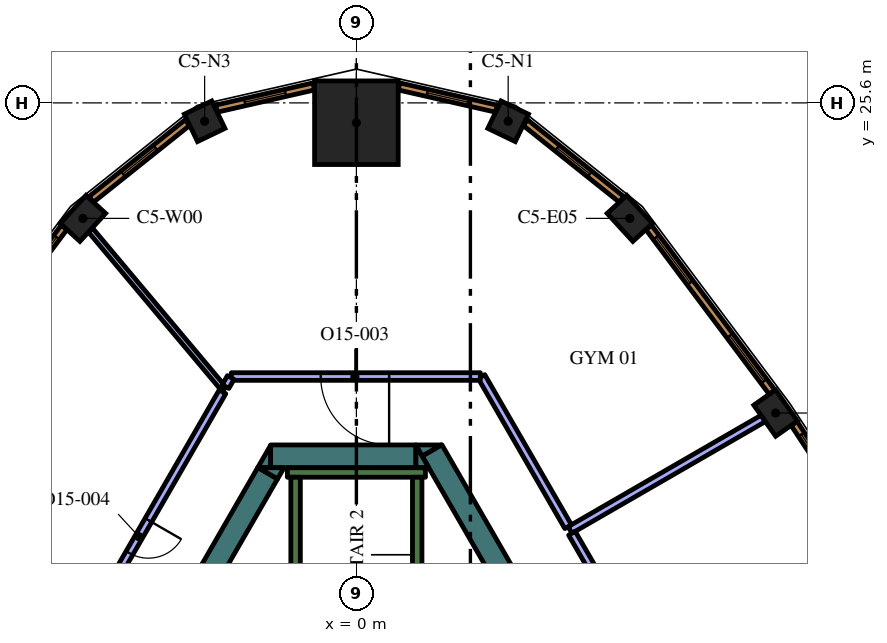
"""IFC4 building model, lengths in metres.
Left out: names, types, materials, properties, quantities, classifications, styles, units other than length and angle.
Written with IfcOpenShell. Run it as: python <this file> out.ifc"""

import sys

from ifc_helpers import new_model, si_unit, direction, frame, frame_2d, origin, origin_2d, place, context, subcontext, project, spatial, polyline, rectangle, outline, extrude, element, fill, save


model = new_model("IFC4")
c1 = context("Model", 3, precision=1e-05, world=origin(), true_north=direction((0.0, 1.0)))
c2 = subcontext(c1, "Body", "Model", "MODEL_VIEW")
j1 = project(units=[si_unit("LENGTHUNIT", "METRE"), si_unit("PLANEANGLEUNIT", "RADIAN")], contexts=[c1])
p1 = place(None, origin())
s1 = spatial("IfcSite", under=j1, at=p1, CompositionType="ELEMENT")
p2 = place(p1, origin())
s2 = spatial("IfcBuilding", under=s1, at=p2, CompositionType="ELEMENT")
p3 = place(p2, frame((0.0, 0.0, 317.4)))
s3 = spatial("IfcBuildingStorey", under=s2, at=p3, CompositionType="ELEMENT", Elevation=317.4)
p4 = place(p3, frame((0.0, 25.078, 0.0), z_axis=(0.0, 0.0, 1.0), x_axis=(0.0, 1.0, 0.0)))
e1 = element("IfcColumn", 1, at=p4, inside=s3, PredefinedType="COLUMN", context=c2, shape_type="SweptSolid", body=[
    extrude(rectangle(XDim=2.2, YDim=2.2, at=origin_2d()), origin(), (0.0, 0.0, 1.0), 4.2),
])
for number, where, z_axis, x_axis in (
    (2, (11.032, 17.44, 0.0), (0.0, 0.0, 1.0), (-0.575, 0.818, 0.0)),
    (3, (7.195, 22.561, 0.0), (0.0, 0.0, 1.0), (-0.676, 0.737, 0.0)),
):
    element("IfcColumn", number, at=place(p3, frame(where, z_axis=z_axis, x_axis=x_axis)), inside=s3, PredefinedType="COLUMN", context=c2, shape_type="SweptSolid", body=[
        extrude(rectangle(XDim=1.0, YDim=0.7, at=origin_2d()), origin(), (0.0, 0.0, 1.0), 4.2),
    ])
for number, where, z_axis, x_axis in (
    (4, (3.993, 25.116, 0.0), (0.0, 0.0, 1.0), (-0.901, 0.434, 0.0)),
    (5, (-3.993, 25.116, 0.0), (0.0, 0.0, 1.0), (-0.901, -0.434, 0.0)),
):
    element("IfcColumn", number, at=place(p3, frame(where, z_axis=z_axis, x_axis=x_axis)), inside=s3, PredefinedType="COLUMN", context=c2, shape_type="SweptSolid", body=[
        extrude(rectangle(XDim=0.8, YDim=0.8, at=origin_2d()), origin(), (0.0, 0.0, 1.0), 4.2),
    ])
p5 = place(p3, frame((-7.195, 22.561, 0.0), z_axis=(0.0, 0.0, 1.0), x_axis=(-0.67580250023, -0.737082750228, 0.0)))
e6 = element("IfcColumn", 6, at=p5, inside=s3, PredefinedType="COLUMN", context=c2, shape_type="SweptSolid", body=[
    extrude(rectangle(XDim=1.0, YDim=0.7, at=origin_2d()), origin(), (0.0, 0.0, 1.0), 4.2),
])
p6 = place(p3, frame((1.989, 16.456, 0.0), z_axis=(0.0, 0.0, 1.0), x_axis=(0.49999102663, -0.8660305845, 0.0)))
e7 = element("IfcWall", 7, at=p6, inside=s3, PredefinedType="SOLIDWALL", context=c2, shape_type="SweptSolid", body=[
    extrude(rectangle(XDim=12.406, YDim=0.6, at=frame_2d((6.203, 0.0))), origin(), (0.0, 0.0, 1.0), 4.2),
])
p7 = place(p3, origin())
e8 = element("IfcWall", 8, at=p7, inside=s3, PredefinedType="SOLIDWALL", context=c2, shape_type="SweptSolid", body=[
    extrude(outline(polyline([(1.559, 16.6), (2.235, 16.6), (1.728, 16.307), (1.559, 16.6)])), origin(), (0.0, 0.0, 1.0), 4.2),
])
p8 = place(p3, frame((-2.258, 16.3, 0.0), z_axis=(0.0, 0.0, 1.0), x_axis=(1.0, 0.0, 0.0)))
e9 = element("IfcWall", 9, at=p8, inside=s3, PredefinedType="SOLIDWALL", context=c2, shape_type="SweptSolid", body=[
    extrude(rectangle(XDim=3.823, YDim=0.6, at=frame_2d((1.912, 0.0))), origin(), (0.0, 0.0, 1.0), 4.2),
])
e10 = element("IfcWall", 10, at=p7, inside=s3, PredefinedType="SOLIDWALL", context=c2, shape_type="SweptSolid", body=[
    extrude(outline(polyline([(1.905, 16.0), (1.567, 16.0), (1.567, 16.585), (1.905, 16.0)])), origin(), (0.0, 0.0, 1.0), 4.2),
])
e11 = element("IfcWall", 11, at=p7, inside=s3, PredefinedType="SOLIDWALL", context=c2, shape_type="SweptSolid", body=[
    extrude(outline(polyline([(-2.598, 16.0), (-2.26, 16.585), (-2.26, 16.0), (-2.598, 16.0)])), origin(), (0.0, 0.0, 1.0), 4.2),
])
p9 = place(p3, frame((-2.335, 15.855, 0.0), z_axis=(0.0, 0.0, 1.0), x_axis=(-0.499960127962, -0.866048422692, 0.0)))
e12 = element("IfcWall", 12, at=p9, inside=s3, PredefinedType="SOLIDWALL", context=c2, shape_type="SweptSolid", body=[
    extrude(rectangle(XDim=2.934, YDim=0.6, at=frame_2d((1.467, 0.0))), origin(), (0.0, 0.0, 1.0), 4.2),
])
e13 = element("IfcWall", 13, at=p7, inside=s3, PredefinedType="SOLIDWALL", context=c2, shape_type="SweptSolid", body=[
    extrude(outline(polyline([(-1.905, 16.0), (-2.074, 15.707), (-2.581, 16.0), (-1.905, 16.0)])), origin(), (0.0, 0.0, 1.0), 4.2),
])
p10 = place(p3, frame((-1.817, 15.875, 0.0), z_axis=(0.0, 0.0, 1.0), x_axis=(1.0, 0.0, 0.0)))
e14 = element("IfcWall", 14, at=p10, inside=s3, PredefinedType="SOLIDWALL", context=c2, shape_type="SweptSolid", body=[
    extrude(rectangle(XDim=3.634, YDim=0.25, at=frame_2d((1.817, 0.0))), origin(), (0.0, 0.0, 1.0), 4.2),
])
p11 = place(p3, frame((1.6, 8.95, 0.0), z_axis=(0.0, 0.0, 1.0), x_axis=(0.0, 1.0, 0.0)))
e15 = element("IfcWall", 15, at=p11, inside=s3, PredefinedType="SOLIDWALL", context=c2, shape_type="SweptSolid", body=[
    extrude(rectangle(XDim=6.8, YDim=0.25, at=frame_2d((3.4, 0.0))), origin(), (0.0, 0.0, 1.0), 4.2),
])
p12 = place(p3, frame((-1.6, 8.7, 0.0), z_axis=(0.0, 0.0, 1.0), x_axis=(0.0, 1.0, 0.0)))
e16 = element("IfcWall", 16, at=p12, inside=s3, PredefinedType="SOLIDWALL", context=c2, shape_type="SweptSolid", body=[
    extrude(rectangle(XDim=7.05, YDim=0.25, at=frame_2d((3.525, 0.0))), origin(), (0.0, 0.0, 1.0), 4.2),
])
p13 = place(p3, frame((5.622, 14.363, 0.0), z_axis=(0.0, 0.0, 1.0), x_axis=(0.866030409726, 0.499991329354, 0.0)))
e17 = element("IfcWall", 17, at=p13, inside=s3, PredefinedType="PARTITIONING", context=c2, shape_type="SweptSolid", body=[
    extrude(rectangle(XDim=5.869, YDim=0.2, at=frame_2d((2.934, 0.0))), origin(), (0.0, 0.0, 1.0), 3.5),
])
p14 = place(p3, frame((7.921, 10.381, 0.0), z_axis=(0.0, 0.0, 1.0), x_axis=(-0.500021625289, 0.866012918058, 0.0)))
e18 = element("IfcWall", 18, at=p14, inside=s3, PredefinedType="PARTITIONING", context=c2, shape_type="SweptSolid", body=[
    extrude(rectangle(XDim=4.497, YDim=0.2, at=frame_2d((2.249, 0.0))), origin(), (0.0, 0.0, 1.0), 3.5),
])
p15 = place(p3, frame((-3.483, 18.067, 0.0), z_axis=(0.0, 0.0, 1.0), x_axis=(-0.642968046165, 0.765893002717, 0.0)))
e19 = element("IfcWall", 19, at=p15, inside=s3, PredefinedType="PARTITIONING", context=c2, shape_type="SweptSolid", body=[
    extrude(rectangle(XDim=5.47, YDim=0.15, at=frame_2d((2.735, 0.0))), origin(), (0.0, 0.0, 1.0), 3.5),
])
p16 = place(p3, frame((5.572, 14.449, 0.0), z_axis=(0.0, 0.0, 1.0), x_axis=(-0.500012761589, 0.866018035752, 0.0)))
e20 = element("IfcWall", 20, at=p16, inside=s3, PredefinedType="PARTITIONING", context=c2, shape_type="SweptSolid", body=[
    extrude(rectangle(XDim=4.562, YDim=0.2, at=frame_2d((2.281, 0.0))), origin(), (0.0, 0.0, 1.0), 3.5),
])
p17 = place(p3, frame((3.261, 18.4, 0.0), z_axis=(0.0, 0.0, 1.0), x_axis=(-1.0, 0.0, 0.0)))
e21 = element("IfcWall", 21, at=p17, inside=s3, PredefinedType="PARTITIONING", context=c2, shape_type="SweptSolid", body=[
    extrude(rectangle(XDim=6.552, YDim=0.2, at=frame_2d((3.276, 0.0))), origin(), (0.0, 0.0, 1.0), 3.5),
])
p18 = place(p17, frame((2.4, 0.0, 0.0)))
e22 = element("IfcOpeningElement", 22, at=p18, cuts=e21, PredefinedType="OPENING", context=c2, shape_type="SweptSolid", body=[
    extrude(rectangle(XDim=1.8, YDim=2.1, at=frame_2d((0.9, 1.05))), frame((0.0, 0.11, 0.0), z_axis=(0.0, -1.0, 0.0), x_axis=(1.0, 0.0, 0.0)), (0.0, 0.0, 1.0), 0.22),
])
p19 = place(p3, frame((-3.306, 18.374, 0.0), z_axis=(0.0, 0.0, 1.0), x_axis=(-0.500055614084, -0.865993292597, 0.0)))
e23 = element("IfcWall", 23, at=p19, inside=s3, PredefinedType="PARTITIONING", context=c2, shape_type="SweptSolid", body=[
    extrude(rectangle(XDim=0.275, YDim=0.2, at=frame_2d((0.137, 0.0))), origin(), (0.0, 0.0, 1.0), 3.5),
])
p20 = place(p3, frame((-3.523, 17.998, 0.0), z_axis=(0.0, 0.0, 1.0), x_axis=(-0.499996383721, -0.866027491634, 0.0)))
e24 = element("IfcWall", 24, at=p20, inside=s3, PredefinedType="PARTITIONING", context=c2, shape_type="SweptSolid", body=[
    extrude(rectangle(XDim=8.795, YDim=0.2, at=frame_2d((4.397, 0.0))), origin(), (0.0, 0.0, 1.0), 3.5),
])
p21 = place(p20, frame((3.9, 0.0, 0.0)))
e25 = element("IfcOpeningElement", 25, at=p21, cuts=e24, PredefinedType="OPENING", context=c2, shape_type="SweptSolid", body=[
    extrude(rectangle(XDim=1.0, YDim=2.1, at=frame_2d((0.5, 1.05))), frame((0.0, 0.11, 0.0), z_axis=(0.0, -1.0, 0.0), x_axis=(1.0, 0.0, 0.0)), (0.0, 0.0, 1.0), 0.22),
])
p22 = place(p3, frame((14.496, 12.653, 0.0), z_axis=(0.0, 0.0, 1.0), x_axis=(-0.550744054781, 0.83467417962, 0.0)))
e26 = element("IfcWall", 26, at=p22, inside=s3, PredefinedType="SOLIDWALL", context=c2, shape_type="SweptSolid", body=[
    extrude(rectangle(XDim=5.406, YDim=0.19, at=frame_2d((2.703, 0.0))), origin(), (0.0, 0.0, 1.0), 3.9),
])
p23 = place(p22, frame((0.346, 0.0, 0.6)))
e27 = element("IfcOpeningElement", 27, at=p23, cuts=e26, PredefinedType="OPENING", context=c2, shape_type="SweptSolid", body=[
    extrude(rectangle(XDim=1.5, YDim=2.85, at=frame_2d((0.75, 1.425))), frame((0.0, 0.105, 0.0), z_axis=(0.0, -1.0, 0.0), x_axis=(1.0, 0.0, 0.0)), (0.0, 0.0, 1.0), 0.21),
])
p24 = place(p22, frame((3.559, 0.0, 0.6)))
e28 = element("IfcOpeningElement", 28, at=p24, cuts=e26, PredefinedType="OPENING", context=c2, shape_type="SweptSolid", body=[
    extrude(rectangle(XDim=1.5, YDim=2.85, at=frame_2d((0.75, 1.425))), frame((0.0, 0.105, 0.0), z_axis=(0.0, -1.0, 0.0), x_axis=(1.0, 0.0, 0.0)), (0.0, 0.0, 1.0), 0.21),
])
p25 = place(p3, frame((10.938, 17.99, 0.0), z_axis=(0.0, 0.0, 1.0), x_axis=(-0.599559865294, 0.800329911929, 0.0)))
e29 = element("IfcWall", 29, at=p25, inside=s3, PredefinedType="SOLIDWALL", context=c2, shape_type="SweptSolid", body=[
    extrude(rectangle(XDim=5.415, YDim=0.19, at=frame_2d((2.708, 0.0))), origin(), (0.0, 0.0, 1.0), 3.9),
])
p26 = place(p25, frame((0.358, 0.0, 0.6)))
e30 = element("IfcOpeningElement", 30, at=p26, cuts=e29, PredefinedType="OPENING", context=c2, shape_type="SweptSolid", body=[
    extrude(rectangle(XDim=1.5, YDim=2.85, at=frame_2d((0.75, 1.425))), frame((0.0, 0.105, 0.0), z_axis=(0.0, -1.0, 0.0), x_axis=(1.0, 0.0, 0.0)), (0.0, 0.0, 1.0), 0.21),
])
p27 = place(p25, frame((3.593, 0.0, 0.6)))
e31 = element("IfcOpeningElement", 31, at=p27, cuts=e29, PredefinedType="OPENING", context=c2, shape_type="SweptSolid", body=[
    extrude(rectangle(XDim=1.5, YDim=2.85, at=frame_2d((0.75, 1.425))), frame((0.0, 0.105, 0.0), z_axis=(0.0, -1.0, 0.0), x_axis=(1.0, 0.0, 0.0)), (0.0, 0.0, 1.0), 0.21),
])
p28 = place(p3, frame((6.977, 23.061, 0.0), z_axis=(0.0, 0.0, 1.0), x_axis=(-0.781626234064, 0.623747088349, 0.0)))
e32 = element("IfcWall", 32, at=p28, inside=s3, PredefinedType="SOLIDWALL", context=c2, shape_type="SweptSolid", body=[
    extrude(rectangle(XDim=3.237, YDim=0.19, at=frame_2d((1.618, 0.0))), origin(), (0.0, 0.0, 1.0), 3.9),
])
p29 = place(p28, frame((1.068, 0.0, 0.6)))
e33 = element("IfcOpeningElement", 33, at=p29, cuts=e32, PredefinedType="OPENING", context=c2, shape_type="SweptSolid", body=[
    extrude(rectangle(XDim=1.1, YDim=2.85, at=frame_2d((0.55, 1.425))), frame((0.0, 0.105, 0.0), z_axis=(0.0, -1.0, 0.0), x_axis=(1.0, 0.0, 0.0)), (0.0, 0.0, 1.0), 0.21),
])
p30 = place(p3, frame((3.683, 25.449, 0.0), z_axis=(0.0, 0.0, 1.0), x_axis=(-0.974913273386, 0.222585060988, 0.0)))
e34 = element("IfcWall", 34, at=p30, inside=s3, PredefinedType="SOLIDWALL", context=c2, shape_type="SweptSolid", body=[
    extrude(rectangle(XDim=2.627, YDim=0.19, at=frame_2d((1.313, 0.0))), origin(), (0.0, 0.0, 1.0), 3.9),
])
p31 = place(p30, frame((0.763, 0.0, 0.6)))
e35 = element("IfcOpeningElement", 35, at=p31, cuts=e34, PredefinedType="OPENING", context=c2, shape_type="SweptSolid", body=[
    extrude(rectangle(XDim=1.1, YDim=2.85, at=frame_2d((0.55, 1.425))), frame((0.0, 0.105, 0.0), z_axis=(0.0, -1.0, 0.0), x_axis=(1.0, 0.0, 0.0)), (0.0, 0.0, 1.0), 0.21),
])
p32 = place(p3, frame((-1.122, 26.033, 0.0), z_axis=(0.0, 0.0, 1.0), x_axis=(-0.974913273386, -0.222585060988, 0.0)))
e36 = element("IfcWall", 36, at=p32, inside=s3, PredefinedType="SOLIDWALL", context=c2, shape_type="SweptSolid", body=[
    extrude(rectangle(XDim=2.627, YDim=0.19, at=frame_2d((1.313, 0.0))), origin(), (0.0, 0.0, 1.0), 3.9),
])
p33 = place(p32, frame((0.763, 0.0, 0.6)))
e37 = element("IfcOpeningElement", 37, at=p33, cuts=e36, PredefinedType="OPENING", context=c2, shape_type="SweptSolid", body=[
    extrude(rectangle(XDim=1.1, YDim=2.85, at=frame_2d((0.55, 1.425))), frame((0.0, 0.105, 0.0), z_axis=(0.0, -1.0, 0.0), x_axis=(1.0, 0.0, 0.0)), (0.0, 0.0, 1.0), 0.21),
])
p34 = place(p3, frame((-4.448, 25.08, 0.0), z_axis=(0.0, 0.0, 1.0), x_axis=(-0.781626234064, -0.623747088349, 0.0)))
e38 = element("IfcWall", 38, at=p34, inside=s3, PredefinedType="SOLIDWALL", context=c2, shape_type="SweptSolid", body=[
    extrude(rectangle(XDim=3.237, YDim=0.19, at=frame_2d((1.618, 0.0))), origin(), (0.0, 0.0, 1.0), 3.9),
])
p35 = place(p34, frame((1.068, 0.0, 0.6)))
e39 = element("IfcOpeningElement", 39, at=p35, cuts=e38, PredefinedType="OPENING", context=c2, shape_type="SweptSolid", body=[
    extrude(rectangle(XDim=1.1, YDim=2.85, at=frame_2d((0.55, 1.425))), frame((0.0, 0.105, 0.0), z_axis=(0.0, -1.0, 0.0), x_axis=(1.0, 0.0, 0.0)), (0.0, 0.0, 1.0), 0.21),
])
p36 = place(p3, frame((-7.692, 22.324, 0.0), z_axis=(0.0, 0.0, 1.0), x_axis=(-0.599559865294, -0.800329911929, 0.0)))
e40 = element("IfcWall", 40, at=p36, inside=s3, PredefinedType="SOLIDWALL", context=c2, shape_type="SweptSolid", body=[
    extrude(rectangle(XDim=5.415, YDim=0.19, at=frame_2d((2.708, 0.0))), origin(), (0.0, 0.0, 1.0), 3.9),
])
p37 = place(p36, frame((0.323, 0.0, 0.6)))
e41 = element("IfcOpeningElement", 41, at=p37, cuts=e40, PredefinedType="OPENING", context=c2, shape_type="SweptSolid", body=[
    extrude(rectangle(XDim=1.5, YDim=2.85, at=frame_2d((0.75, 1.425))), frame((0.0, 0.105, 0.0), z_axis=(0.0, -1.0, 0.0), x_axis=(1.0, 0.0, 0.0)), (0.0, 0.0, 1.0), 0.21),
])
p38 = place(p36, frame((3.558, 0.0, 0.6)))
e42 = element("IfcOpeningElement", 42, at=p38, cuts=e40, PredefinedType="OPENING", context=c2, shape_type="SweptSolid", body=[
    extrude(rectangle(XDim=1.5, YDim=2.85, at=frame_2d((0.75, 1.425))), frame((0.0, 0.105, 0.0), z_axis=(0.0, -1.0, 0.0), x_axis=(1.0, 0.0, 0.0)), (0.0, 0.0, 1.0), 0.21),
])
p39 = place(p18, origin())
e43 = element("IfcDoor", 43, at=p39, inside=s3, OperationType="DOUBLE_DOOR_SINGLE_SWING", PredefinedType="DOOR", context=c2, shape_type="SweptSolid", body=[
    extrude(rectangle(XDim=1.8, YDim=2.1, at=frame_2d((0.9, 1.05))), frame((0.0, 0.025, 0.0), z_axis=(0.0, -1.0, 0.0), x_axis=(1.0, 0.0, 0.0)), (0.0, 0.0, 1.0), 0.05),
])
fill(e22, e43)
p40 = place(p21, origin())
e44 = element("IfcDoor", 44, at=p40, inside=s3, OperationType="SINGLE_SWING_RIGHT", PredefinedType="DOOR", context=c2, shape_type="SweptSolid", body=[
    extrude(rectangle(XDim=1.0, YDim=2.1, at=frame_2d((0.5, 1.05))), frame((0.0, 0.025, 0.0), z_axis=(0.0, -1.0, 0.0), x_axis=(1.0, 0.0, 0.0)), (0.0, 0.0, 1.0), 0.05),
])
fill(e25, e44)
p41 = place(p24, origin())
e45 = element("IfcWindow", 45, at=p41, inside=s3, PartitioningType="SINGLE_PANEL", PredefinedType="WINDOW", context=c2, shape_type="SweptSolid", body=[
    extrude(rectangle(XDim=1.5, YDim=2.85, at=frame_2d((0.75, 1.425))), frame((0.0, 0.045, 0.0), z_axis=(0.0, -1.0, 0.0), x_axis=(1.0, 0.0, 0.0)), (0.0, 0.0, 1.0), 0.06),
])
fill(e28, e45)
p42 = place(p26, origin())
e46 = element("IfcWindow", 46, at=p42, inside=s3, PartitioningType="SINGLE_PANEL", PredefinedType="WINDOW", context=c2, shape_type="SweptSolid", body=[
    extrude(rectangle(XDim=1.5, YDim=2.85, at=frame_2d((0.75, 1.425))), frame((0.0, 0.045, 0.0), z_axis=(0.0, -1.0, 0.0), x_axis=(1.0, 0.0, 0.0)), (0.0, 0.0, 1.0), 0.06),
])
fill(e30, e46)
p43 = place(p27, origin())
e47 = element("IfcWindow", 47, at=p43, inside=s3, PartitioningType="SINGLE_PANEL", PredefinedType="WINDOW", context=c2, shape_type="SweptSolid", body=[
    extrude(rectangle(XDim=1.5, YDim=2.85, at=frame_2d((0.75, 1.425))), frame((0.0, 0.045, 0.0), z_axis=(0.0, -1.0, 0.0), x_axis=(1.0, 0.0, 0.0)), (0.0, 0.0, 1.0), 0.06),
])
fill(e31, e47)
p44 = place(p29, origin())
e48 = element("IfcWindow", 48, at=p44, inside=s3, PartitioningType="SINGLE_PANEL", PredefinedType="WINDOW", context=c2, shape_type="SweptSolid", body=[
    extrude(rectangle(XDim=1.1, YDim=2.85, at=frame_2d((0.55, 1.425))), frame((0.0, 0.045, 0.0), z_axis=(0.0, -1.0, 0.0), x_axis=(1.0, 0.0, 0.0)), (0.0, 0.0, 1.0), 0.06),
])
fill(e33, e48)
p45 = place(p31, origin())
e49 = element("IfcWindow", 49, at=p45, inside=s3, PartitioningType="SINGLE_PANEL", PredefinedType="WINDOW", context=c2, shape_type="SweptSolid", body=[
    extrude(rectangle(XDim=1.1, YDim=2.85, at=frame_2d((0.55, 1.425))), frame((0.0, 0.045, 0.0), z_axis=(0.0, -1.0, 0.0), x_axis=(1.0, 0.0, 0.0)), (0.0, 0.0, 1.0), 0.06),
])
fill(e35, e49)
p46 = place(p33, origin())
e50 = element("IfcWindow", 50, at=p46, inside=s3, PartitioningType="SINGLE_PANEL", PredefinedType="WINDOW", context=c2, shape_type="SweptSolid", body=[
    extrude(rectangle(XDim=1.1, YDim=2.85, at=frame_2d((0.55, 1.425))), frame((0.0, 0.045, 0.0), z_axis=(0.0, -1.0, 0.0), x_axis=(1.0, 0.0, 0.0)), (0.0, 0.0, 1.0), 0.06),
])
fill(e37, e50)
p47 = place(p35, origin())
e51 = element("IfcWindow", 51, at=p47, inside=s3, PartitioningType="SINGLE_PANEL", PredefinedType="WINDOW", context=c2, shape_type="SweptSolid", body=[
    extrude(rectangle(XDim=1.1, YDim=2.85, at=frame_2d((0.55, 1.425))), frame((0.0, 0.045, 0.0), z_axis=(0.0, -1.0, 0.0), x_axis=(1.0, 0.0, 0.0)), (0.0, 0.0, 1.0), 0.06),
])
fill(e39, e51)
p48 = place(p37, origin())
e52 = element("IfcWindow", 52, at=p48, inside=s3, PartitioningType="SINGLE_PANEL", PredefinedType="WINDOW", context=c2, shape_type="SweptSolid", body=[
    extrude(rectangle(XDim=1.5, YDim=2.85, at=frame_2d((0.75, 1.425))), frame((0.0, 0.045, 0.0), z_axis=(0.0, -1.0, 0.0), x_axis=(1.0, 0.0, 0.0)), (0.0, 0.0, 1.0), 0.06),
])
fill(e41, e52)
save(model, sys.argv[1])
